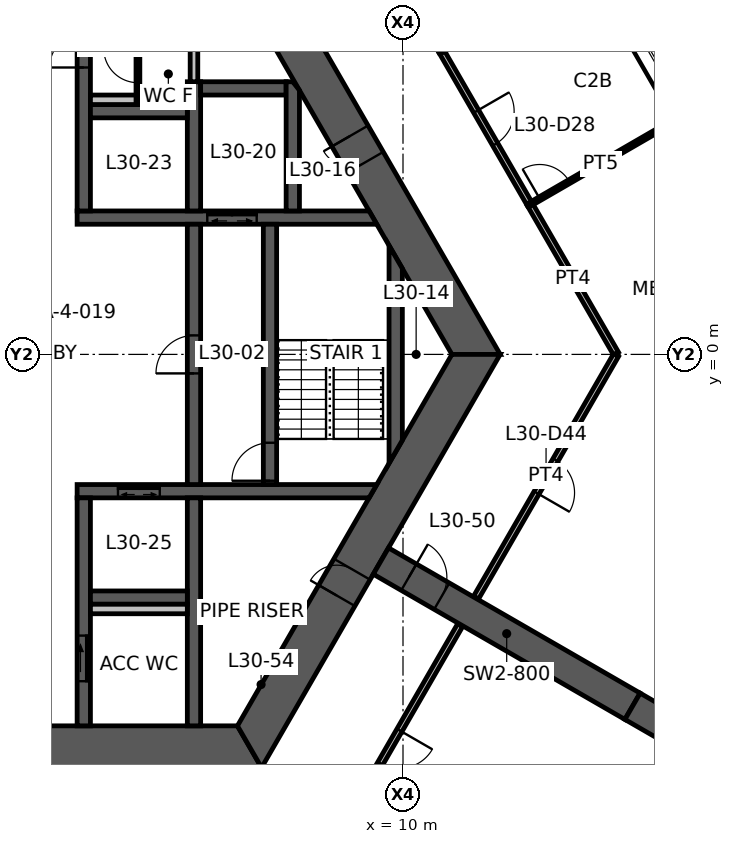
"""IFC4 building model, lengths in metres.
Left out: names, types, materials, properties, quantities, classifications, styles, units other than length and angle.
Written with IfcOpenShell. Run it as: python <this file> out.ifc"""

import sys

from ifc_helpers import new_model, si_unit, direction, frame, frame_2d, origin, place, context, subcontext, project, spatial, polyline, rectangle, outline, extrude, element, fill, save


model = new_model("IFC4")
c1 = context("Model", 3, precision=1e-05, world=origin(), true_north=direction((0.0, 1.0)))
c2 = subcontext(c1, "Body", "Model", "MODEL_VIEW")
j1 = project(units=[si_unit("LENGTHUNIT", "METRE"), si_unit("PLANEANGLEUNIT", "RADIAN")], contexts=[c1])
p1 = place(None, origin())
s1 = spatial("IfcSite", under=j1, at=p1, CompositionType="ELEMENT")
p2 = place(p1, origin())
s2 = spatial("IfcBuilding", under=s1, at=p2, CompositionType="ELEMENT")
p3 = place(p2, frame((0.0, 0.0, 119.7)))
s3 = spatial("IfcBuildingStorey", under=s2, at=p3, CompositionType="ELEMENT", Elevation=119.7)
p4 = place(p3, frame((11.922, 0.0, 0.0), z_axis=(0.0, 0.0, 1.0), x_axis=(-0.500004296715, 0.866022923061, 0.0)))
e1 = element("IfcWall", 1, at=p4, inside=s3, PredefinedType="SHEAR", context=c2, shape_type="SweptSolid", body=[
    extrude(outline(polyline([(-0.318, -0.55), (5.835, -0.55), (6.635, -0.55), (12.24, -0.55), (11.605, 0.55), (6.635, 0.55), (5.835, 0.55), (0.318, 0.55), (-0.318, -0.55)])), origin(), (0.0, 0.0, 1.0), 3.9),
])
p5 = place(p4, frame((5.835, 0.0, 0.0)))
e2 = element("IfcOpeningElement", 2, at=p5, cuts=e1, PredefinedType="OPENING", context=c2, shape_type="SweptSolid", body=[
    extrude(rectangle(XDim=0.8, YDim=2.1, at=frame_2d((0.4, 1.05))), frame((0.0, 0.56, 0.0), z_axis=(0.0, -1.0, 0.0), x_axis=(1.0, 0.0, 0.0)), (0.0, 0.0, 1.0), 1.12),
])
p6 = place(p3, frame((-5.961, -10.325, 0.0), z_axis=(0.0, 0.0, 1.0), x_axis=(1.0, 0.0, 0.0)))
e3 = element("IfcWall", 3, at=p6, inside=s3, PredefinedType="SHEAR", context=c2, shape_type="SweptSolid", body=[
    extrude(outline(polyline([(-0.318, -0.55), (5.461, -0.55), (6.461, -0.55), (12.24, -0.55), (11.605, 0.55), (6.461, 0.55), (5.461, 0.55), (0.318, 0.55), (-0.318, -0.55)])), origin(), (0.0, 0.0, 1.0), 3.9),
])
p7 = place(p6, frame((5.461, 0.0, 0.0)))
e4 = element("IfcOpeningElement", 4, at=p7, cuts=e3, PredefinedType="OPENING", context=c2, shape_type="SweptSolid", body=[
    extrude(rectangle(XDim=1.0, YDim=2.1, at=frame_2d((0.5, 1.05))), frame((0.0, 0.56, 0.0), z_axis=(0.0, -1.0, 0.0), x_axis=(1.0, 0.0, 0.0)), (0.0, 0.0, 1.0), 1.12),
])
p8 = place(p3, frame((5.961, -10.325, 0.0), z_axis=(0.0, 0.0, 1.0), x_axis=(0.500004296715, 0.866022923061, 0.0)))
e5 = element("IfcWall", 5, at=p8, inside=s3, PredefinedType="SHEAR", context=c2, shape_type="SweptSolid", body=[
    extrude(outline(polyline([(-0.318, -0.55), (4.594, -0.55), (5.394, -0.55), (12.24, -0.55), (11.605, 0.55), (5.394, 0.55), (4.594, 0.55), (0.318, 0.55), (-0.318, -0.55)])), origin(), (0.0, 0.0, 1.0), 3.9),
])
p9 = place(p8, frame((4.594, 0.0, 0.0)))
e6 = element("IfcOpeningElement", 6, at=p9, cuts=e5, PredefinedType="OPENING", context=c2, shape_type="SweptSolid", body=[
    extrude(rectangle(XDim=0.8, YDim=2.1, at=frame_2d((0.4, 1.05))), frame((0.0, 0.56, 0.0), z_axis=(0.0, -1.0, 0.0), x_axis=(1.0, 0.0, 0.0)), (0.0, 0.0, 1.0), 1.12),
])
p10 = place(p3, frame((9.418, -5.438, 0.0), z_axis=(0.0, 0.0, 1.0), x_axis=(0.866029782078, -0.499992416496, 0.0)))
e7 = element("IfcWall", 7, at=p10, inside=s3, PredefinedType="SHEAR", context=c2, shape_type="SweptSolid", body=[
    extrude(rectangle(XDim=7.646, YDim=0.8, at=frame_2d((3.823, 0.0))), origin(), (0.0, 0.0, 1.0), 3.9),
])
p11 = place(p10, frame((0.85, 0.0, 0.0)))
e8 = element("IfcOpeningElement", 8, at=p11, cuts=e7, PredefinedType="OPENING", context=c2, shape_type="SweptSolid", body=[
    extrude(rectangle(XDim=1.0, YDim=2.1, at=frame_2d((0.5, 1.05))), frame((0.0, 0.41, 0.0), z_axis=(0.0, -1.0, 0.0), x_axis=(1.0, 0.0, 0.0)), (0.0, 0.0, 1.0), 0.82),
])
p12 = place(p3, frame((16.039, -9.26, 0.0), z_axis=(0.0, 0.0, 1.0), x_axis=(0.866024837091, -0.50000098154, 0.0)))
e9 = element("IfcWall", 9, at=p12, inside=s3, PredefinedType="SHEAR", context=c2, shape_type="SweptSolid", body=[
    extrude(rectangle(XDim=13.0, YDim=0.8, at=frame_2d((6.5, 0.0))), origin(), (0.0, 0.0, 1.0), 3.9),
])
p13 = place(p3, frame((1.425, 3.6, 0.0), z_axis=(0.0, 0.0, 1.0), x_axis=(1.0, 0.0, 0.0)))
e10 = element("IfcWall", 10, at=p13, inside=s3, PredefinedType="SHEAR", context=c2, shape_type="SweptSolid", body=[
    extrude(outline(polyline([(0.0, -0.175), (3.425, -0.175), (4.725, -0.175), (7.885, -0.175), (7.683, 0.175), (4.725, 0.175), (3.425, 0.175), (0.0, 0.175), (0.0, -0.175)])), origin(), (0.0, 0.0, 1.0), 3.9),
])
p14 = place(p13, frame((3.425, 0.0, 0.0)))
e11 = element("IfcOpeningElement", 11, at=p14, cuts=e10, PredefinedType="OPENING", context=c2, shape_type="SweptSolid", body=[
    extrude(rectangle(XDim=1.3, YDim=2.1, at=frame_2d((0.65, 1.05))), frame((0.0, 0.185, 0.0), z_axis=(0.0, -1.0, 0.0), x_axis=(1.0, 0.0, 0.0)), (0.0, 0.0, 1.0), 0.37),
])
p15 = place(p3, frame((1.425, -3.6, 0.0), z_axis=(0.0, 0.0, 1.0), x_axis=(1.0, 0.0, 0.0)))
e12 = element("IfcWall", 12, at=p15, inside=s3, PredefinedType="SHEAR", context=c2, shape_type="SweptSolid", body=[
    extrude(outline(polyline([(0.0, -0.175), (1.075, -0.175), (2.175, -0.175), (7.683, -0.175), (7.885, 0.175), (2.175, 0.175), (1.075, 0.175), (0.0, 0.175), (0.0, -0.175)])), origin(), (0.0, 0.0, 1.0), 3.9),
])
p16 = place(p15, frame((1.075, 0.0, 0.0)))
e13 = element("IfcOpeningElement", 13, at=p16, cuts=e12, PredefinedType="OPENING", context=c2, shape_type="SweptSolid", body=[
    extrude(rectangle(XDim=1.1, YDim=2.1, at=frame_2d((0.55, 1.05))), frame((0.0, 0.185, 0.0), z_axis=(0.0, -1.0, 0.0), x_axis=(1.0, 0.0, 0.0)), (0.0, 0.0, 1.0), 0.37),
])
p17 = place(p3, frame((1.6, 3.775, 0.0), z_axis=(0.0, 0.0, 1.0), x_axis=(0.0, 1.0, 0.0)))
e14 = element("IfcWall", 14, at=p17, inside=s3, PredefinedType="SHEAR", context=c2, shape_type="SweptSolid", body=[
    extrude(rectangle(XDim=6.0, YDim=0.35, at=frame_2d((3.0, 0.0))), origin(), (0.0, 0.0, 1.0), 3.9),
])
p18 = place(p17, frame((3.775, 0.0, 0.0)))
e15 = element("IfcOpeningElement", 15, at=p18, cuts=e14, PredefinedType="OPENING", context=c2, shape_type="SweptSolid", body=[
    extrude(rectangle(XDim=0.9, YDim=2.1, at=frame_2d((0.45, 1.05))), frame((0.0, 0.185, 0.0), z_axis=(0.0, -1.0, 0.0), x_axis=(1.0, 0.0, 0.0)), (0.0, 0.0, 1.0), 0.37),
])
p19 = place(p3, frame((1.6, -3.775, 0.0), z_axis=(0.0, 0.0, 1.0), x_axis=(0.0, -1.0, 0.0)))
e16 = element("IfcWall", 16, at=p19, inside=s3, PredefinedType="SHEAR", context=c2, shape_type="SweptSolid", body=[
    extrude(rectangle(XDim=6.0, YDim=0.35, at=frame_2d((3.0, 0.0))), origin(), (0.0, 0.0, 1.0), 3.9),
])
p20 = place(p19, frame((3.625, 0.0, 0.0)))
e17 = element("IfcOpeningElement", 17, at=p20, cuts=e16, PredefinedType="OPENING", context=c2, shape_type="SweptSolid", body=[
    extrude(rectangle(XDim=1.2, YDim=2.1, at=frame_2d((0.6, 1.05))), frame((0.0, 0.185, 0.0), z_axis=(0.0, -1.0, 0.0), x_axis=(1.0, 0.0, 0.0)), (0.0, 0.0, 1.0), 0.37),
])
p21 = place(p3, frame((4.5, -3.425, 0.0), z_axis=(0.0, 0.0, 1.0), x_axis=(0.0, 1.0, 0.0)))
e18 = element("IfcWall", 18, at=p21, inside=s3, PredefinedType="SHEAR", context=c2, shape_type="SweptSolid", body=[
    extrude(rectangle(XDim=6.85, YDim=0.35, at=frame_2d((3.425, 0.0))), origin(), (0.0, 0.0, 1.0), 3.9),
])
p22 = place(p21, frame((2.925, 0.0, 0.0)))
e19 = element("IfcOpeningElement", 19, at=p22, cuts=e18, PredefinedType="OPENING", context=c2, shape_type="SweptSolid", body=[
    extrude(rectangle(XDim=1.0, YDim=2.1, at=frame_2d((0.5, 1.05))), frame((0.0, 0.185, 0.0), z_axis=(0.0, -1.0, 0.0), x_axis=(1.0, 0.0, 0.0)), (0.0, 0.0, 1.0), 0.37),
])
p23 = place(p3, frame((6.5, -3.425, 0.0), z_axis=(0.0, 0.0, 1.0), x_axis=(0.0, 1.0, 0.0)))
e20 = element("IfcWall", 20, at=p23, inside=s3, PredefinedType="SHEAR", context=c2, shape_type="SweptSolid", body=[
    extrude(rectangle(XDim=6.85, YDim=0.35, at=frame_2d((3.425, 0.0))), origin(), (0.0, 0.0, 1.0), 3.9),
])
p24 = place(p23, frame((0.1, 0.0, 0.0)))
e21 = element("IfcOpeningElement", 21, at=p24, cuts=e20, PredefinedType="OPENING", context=c2, shape_type="SweptSolid", body=[
    extrude(rectangle(XDim=1.0, YDim=2.1, at=frame_2d((0.5, 1.05))), frame((0.0, 0.185, 0.0), z_axis=(0.0, -1.0, 0.0), x_axis=(1.0, 0.0, 0.0)), (0.0, 0.0, 1.0), 0.37),
])
p25 = place(p3, frame((4.5, 3.775, 0.0), z_axis=(0.0, 0.0, 1.0), x_axis=(0.0, 1.0, 0.0)))
e22 = element("IfcWall", 22, at=p25, inside=s3, PredefinedType="SHEAR", context=c2, shape_type="SweptSolid", body=[
    extrude(rectangle(XDim=3.4, YDim=0.35, at=frame_2d((1.7, 0.0))), origin(), (0.0, 0.0, 1.0), 3.9),
])
p26 = place(p3, frame((4.5, -3.775, 0.0), z_axis=(0.0, 0.0, 1.0), x_axis=(0.0, -1.0, 0.0)))
e23 = element("IfcWall", 23, at=p26, inside=s3, PredefinedType="SHEAR", context=c2, shape_type="SweptSolid", body=[
    extrude(rectangle(XDim=6.0, YDim=0.35, at=frame_2d((3.0, 0.0))), origin(), (0.0, 0.0, 1.0), 3.9),
])
for number, where, z_axis, x_axis in (
    (24, (1.775, 6.4, 0.0), (0.0, 0.0, 1.0), (1.0, 0.0, 0.0)),
    (25, (1.775, -6.4, 0.0), (0.0, 0.0, 1.0), (1.0, 0.0, 0.0)),
):
    element("IfcWall", number, at=place(p3, frame(where, z_axis=z_axis, x_axis=x_axis)), inside=s3, PredefinedType="SHEAR", context=c2, shape_type="SweptSolid", body=[
        extrude(rectangle(XDim=2.55, YDim=0.35, at=frame_2d((1.275, 0.0))), origin(), (0.0, 0.0, 1.0), 3.9),
    ])
p27 = place(p3, frame((4.675, 7.0, 0.0), z_axis=(0.0, 0.0, 1.0), x_axis=(1.0, 0.0, 0.0)))
e26 = element("IfcWall", 26, at=p27, inside=s3, PredefinedType="SHEAR", context=c2, shape_type="SweptSolid", body=[
    extrude(rectangle(XDim=2.25, YDim=0.35, at=frame_2d((1.125, 0.0))), origin(), (0.0, 0.0, 1.0), 3.9),
])
p28 = place(p3, frame((7.1, 3.775, 0.0), z_axis=(0.0, 0.0, 1.0), x_axis=(0.0, 1.0, 0.0)))
e27 = element("IfcWall", 27, at=p28, inside=s3, PredefinedType="SHEAR", context=c2, shape_type="SweptSolid", body=[
    extrude(outline(polyline([(0.0, -0.175), (3.175, -0.175), (3.4, 0.0), (3.4, 0.175), (0.0, 0.175), (0.0, -0.175)])), origin(), (0.0, 0.0, 1.0), 3.9),
])
p29 = place(p3, frame((9.808, -2.562, 0.0), z_axis=(0.0, 0.0, 1.0), x_axis=(0.0, 1.0, 0.0)))
e28 = element("IfcWall", 28, at=p29, inside=s3, PredefinedType="SHEAR", context=c2, shape_type="SweptSolid", body=[
    extrude(outline(polyline([(0.303, -0.175), (4.821, -0.175), (5.428, 0.175), (-0.303, 0.175), (0.303, -0.175)])), origin(), (0.0, 0.0, 1.0), 3.9),
])
p30 = place(p3, frame((4.5, 7.175, 0.0), z_axis=(0.0, 0.0, 1.0), x_axis=(0.0, 1.0, 0.0)))
e29 = element("IfcWall", 29, at=p30, inside=s3, PredefinedType="STANDARD", context=c2, shape_type="SweptSolid", body=[
    extrude(rectangle(XDim=2.6, YDim=0.2, at=frame_2d((1.3, 0.0))), origin(), (0.0, 0.0, 1.0), 3.9),
])
for number, where, z_axis, x_axis in (
    (30, (1.775, 6.7, 0.0), (0.0, 0.0, 1.0), (1.0, 0.0, 0.0)),
    (31, (1.775, -6.7, 0.0), (0.0, 0.0, 1.0), (1.0, 0.0, 0.0)),
):
    element("IfcWall", number, at=place(p3, frame(where, z_axis=z_axis, x_axis=x_axis)), inside=s3, PredefinedType="PLUMBINGWALL", context=c2, shape_type="SweptSolid", body=[
        extrude(rectangle(XDim=2.55, YDim=0.25, at=frame_2d((1.275, 0.0))), origin(), (0.0, 0.0, 1.0), 3.9),
    ])
p31 = place(p3, frame((3.025, 6.575, 0.0), z_axis=(0.0, 0.0, 1.0), x_axis=(0.0, 1.0, 0.0)))
e32 = element("IfcWall", 32, at=p31, inside=s3, PredefinedType="PARTITIONING", context=c2, shape_type="SweptSolid", body=[
    extrude(rectangle(XDim=3.2, YDim=0.1, at=frame_2d((1.6, 0.0))), origin(), (0.0, 0.0, 1.0), 2.35),
])
p32 = place(p31, frame((0.575, 0.0, 0.0)))
e33 = element("IfcOpeningElement", 33, at=p32, cuts=e32, PredefinedType="OPENING", context=c2, shape_type="SweptSolid", body=[
    extrude(rectangle(XDim=0.9, YDim=2.1, at=frame_2d((0.45, 1.05))), frame((0.0, 0.06, 0.0), z_axis=(0.0, -1.0, 0.0), x_axis=(1.0, 0.0, 0.0)), (0.0, 0.0, 1.0), 0.12),
])
p33 = place(p31, frame((2.1, 0.0, 0.0)))
e34 = element("IfcOpeningElement", 34, at=p33, cuts=e32, PredefinedType="OPENING", context=c2, shape_type="SweptSolid", body=[
    extrude(rectangle(XDim=0.9, YDim=2.1, at=frame_2d((0.45, 1.05))), frame((0.0, 0.06, 0.0), z_axis=(0.0, -1.0, 0.0), x_axis=(1.0, 0.0, 0.0)), (0.0, 0.0, 1.0), 0.12),
])
p34 = place(p3, frame((9.51, 10.577, 0.0), z_axis=(0.0, 0.0, 1.0), x_axis=(0.499977562641, -0.866038357612, 0.0)))
e35 = element("IfcWall", 35, at=p34, inside=s3, PredefinedType="PARTITIONING", context=c2, shape_type="SweptSolid", body=[
    extrude(rectangle(XDim=3.01, YDim=0.15, at=frame_2d((1.505, 0.0))), origin(), (0.0, 0.0, 1.0), 2.35),
])
p35 = place(p3, frame((13.334, 3.955, 0.0), z_axis=(0.0, 0.0, 1.0), x_axis=(0.499987549055, -0.866032592222, 0.0)))
e36 = element("IfcWall", 36, at=p35, inside=s3, PredefinedType="PARTITIONING", context=c2, shape_type="SweptSolid", body=[
    extrude(rectangle(XDim=4.544, YDim=0.15, at=frame_2d((2.272, 0.0))), origin(), (0.0, 0.0, 1.0), 2.35),
])
p36 = place(p3, frame((11.011, 7.979, 0.0), z_axis=(0.0, 0.0, 1.0), x_axis=(0.500008456887, -0.866020521143, 0.0)))
e37 = element("IfcWall", 37, at=p36, inside=s3, PredefinedType="PARTITIONING", context=c2, shape_type="SweptSolid", body=[
    extrude(rectangle(XDim=4.655, YDim=0.15, at=frame_2d((2.328, 0.0))), origin(), (0.0, 0.0, 1.0), 2.35),
])
p37 = place(p36, frame((1.828, 0.0, 0.0)))
e38 = element("IfcOpeningElement", 38, at=p37, cuts=e37, PredefinedType="OPENING", context=c2, shape_type="SweptSolid", body=[
    extrude(rectangle(XDim=1.0, YDim=2.1, at=frame_2d((0.5, 1.05))), frame((0.0, 0.085, 0.0), z_axis=(0.0, -1.0, 0.0), x_axis=(1.0, 0.0, 0.0)), (0.0, 0.0, 1.0), 0.17),
])
p38 = place(p3, frame((13.438, 9.375, 0.0), z_axis=(0.0, 0.0, 1.0), x_axis=(-0.866817750494, -0.498625097071, 0.0)))
e39 = element("IfcWall", 39, at=p38, inside=s3, PredefinedType="PARTITIONING", context=c2, shape_type="SweptSolid", body=[
    extrude(rectangle(XDim=2.8, YDim=0.1, at=frame_2d((1.4, 0.0))), origin(), (0.0, 0.0, 1.0), 2.35),
])
p39 = place(p3, frame((13.338, 3.947, 0.0), z_axis=(0.0, 0.0, 1.0), x_axis=(0.865505397626, 0.500899597405, 0.0)))
e40 = element("IfcWall", 40, at=p39, inside=s3, PredefinedType="PARTITIONING", context=c2, shape_type="SweptSolid", body=[
    extrude(rectangle(XDim=4.295, YDim=0.1, at=frame_2d((2.148, 0.0))), origin(), (0.0, 0.0, 1.0), 2.35),
])
p40 = place(p39, frame((0.3, 0.0, 0.0)))
e41 = element("IfcOpeningElement", 41, at=p40, cuts=e40, PredefinedType="OPENING", context=c2, shape_type="SweptSolid", body=[
    extrude(rectangle(XDim=0.9, YDim=2.1, at=frame_2d((0.45, 1.05))), frame((0.0, 0.06, 0.0), z_axis=(0.0, -1.0, 0.0), x_axis=(1.0, 0.0, 0.0)), (0.0, 0.0, 1.0), 0.12),
])
p41 = place(p3, frame((15.606, -0.02, 0.0), z_axis=(0.0, 0.0, 1.0), x_axis=(-0.499989298045, -0.866031582473, 0.0)))
e42 = element("IfcWall", 42, at=p41, inside=s3, PredefinedType="PARTITIONING", context=c2, shape_type="SweptSolid", body=[
    extrude(rectangle(XDim=7.365, YDim=0.15, at=frame_2d((3.683, 0.0))), origin(), (0.0, 0.0, 1.0), 2.35),
])
p42 = place(p41, frame((3.183, 0.0, 0.0)))
e43 = element("IfcOpeningElement", 43, at=p42, cuts=e42, PredefinedType="OPENING", context=c2, shape_type="SweptSolid", body=[
    extrude(rectangle(XDim=1.0, YDim=2.1, at=frame_2d((0.5, 1.05))), frame((0.0, 0.085, 0.0), z_axis=(0.0, -1.0, 0.0), x_axis=(1.0, 0.0, 0.0)), (0.0, 0.0, 1.0), 0.17),
])
p43 = place(p3, frame((11.503, -7.126, 0.0), z_axis=(0.0, 0.0, 1.0), x_axis=(-0.500005620463, -0.866022158784, 0.0)))
e44 = element("IfcWall", 44, at=p43, inside=s3, PredefinedType="PARTITIONING", context=c2, shape_type="SweptSolid", body=[
    extrude(rectangle(XDim=7.389, YDim=0.15, at=frame_2d((3.694, 0.0))), origin(), (0.0, 0.0, 1.0), 2.35),
])
p44 = place(p43, frame((3.194, 0.0, 0.0)))
e45 = element("IfcOpeningElement", 45, at=p44, cuts=e44, PredefinedType="OPENING", context=c2, shape_type="SweptSolid", body=[
    extrude(rectangle(XDim=1.0, YDim=2.1, at=frame_2d((0.5, 1.05))), frame((0.0, 0.085, 0.0), z_axis=(0.0, -1.0, 0.0), x_axis=(1.0, 0.0, 0.0)), (0.0, 0.0, 1.0), 0.17),
])
p45 = place(p5, origin())
e46 = element("IfcDoor", 46, at=p45, inside=s3, OperationType="SINGLE_SWING_RIGHT", PredefinedType="DOOR", context=c2, shape_type="SweptSolid", body=[
    extrude(rectangle(XDim=0.8, YDim=2.1, at=frame_2d((0.4, 1.05))), frame((0.0, 0.025, 0.0), z_axis=(0.0, -1.0, 0.0), x_axis=(1.0, 0.0, 0.0)), (0.0, 0.0, 1.0), 0.05),
])
fill(e2, e46)
p46 = place(p9, origin())
e47 = element("IfcDoor", 47, at=p46, inside=s3, OperationType="SINGLE_SWING_LEFT", PredefinedType="DOOR", context=c2, shape_type="SweptSolid", body=[
    extrude(rectangle(XDim=0.8, YDim=2.1, at=frame_2d((0.4, 1.05))), frame((0.0, 0.025, 0.0), z_axis=(0.0, -1.0, 0.0), x_axis=(1.0, 0.0, 0.0)), (0.0, 0.0, 1.0), 0.05),
])
fill(e6, e47)
p47 = place(p22, origin())
e48 = element("IfcDoor", 48, at=p47, inside=s3, OperationType="SINGLE_SWING_LEFT", PredefinedType="DOOR", context=c2, shape_type="SweptSolid", body=[
    extrude(rectangle(XDim=1.0, YDim=2.1, at=frame_2d((0.5, 1.05))), frame((0.0, 0.025, 0.0), z_axis=(0.0, -1.0, 0.0), x_axis=(1.0, 0.0, 0.0)), (0.0, 0.0, 1.0), 0.05),
])
fill(e19, e48)
p48 = place(p24, origin())
e49 = element("IfcDoor", 49, at=p48, inside=s3, OperationType="SINGLE_SWING_LEFT", PredefinedType="DOOR", context=c2, shape_type="SweptSolid", body=[
    extrude(rectangle(XDim=1.0, YDim=2.1, at=frame_2d((0.5, 1.05))), frame((0.0, 0.025, 0.0), z_axis=(0.0, -1.0, 0.0), x_axis=(1.0, 0.0, 0.0)), (0.0, 0.0, 1.0), 0.05),
])
fill(e21, e49)
p49 = place(p18, origin())
e50 = element("IfcDoor", 50, at=p49, inside=s3, OperationType="SINGLE_SWING_LEFT", PredefinedType="DOOR", context=c2, shape_type="SweptSolid", body=[
    extrude(rectangle(XDim=0.9, YDim=2.1, at=frame_2d((0.45, 1.05))), frame((0.0, 0.025, 0.0), z_axis=(0.0, -1.0, 0.0), x_axis=(1.0, 0.0, 0.0)), (0.0, 0.0, 1.0), 0.05),
])
fill(e15, e50)
p50 = place(p20, origin())
e51 = element("IfcDoor", 51, at=p50, inside=s3, OperationType="SLIDING_TO_LEFT", PredefinedType="DOOR", context=c2, shape_type="SweptSolid", body=[
    extrude(rectangle(XDim=1.2, YDim=2.1, at=frame_2d((0.6, 1.05))), frame((0.0, 0.025, 0.0), z_axis=(0.0, -1.0, 0.0), x_axis=(1.0, 0.0, 0.0)), (0.0, 0.0, 1.0), 0.05),
])
fill(e17, e51)
p51 = place(p11, origin())
e52 = element("IfcDoor", 52, at=p51, inside=s3, OperationType="SINGLE_SWING_LEFT", PredefinedType="DOOR", context=c2, shape_type="SweptSolid", body=[
    extrude(rectangle(XDim=1.0, YDim=2.1, at=frame_2d((0.5, 1.05))), frame((0.0, 0.025, 0.0), z_axis=(0.0, -1.0, 0.0), x_axis=(1.0, 0.0, 0.0)), (0.0, 0.0, 1.0), 0.05),
])
fill(e8, e52)
p52 = place(p32, origin())
e53 = element("IfcDoor", 53, at=p52, inside=s3, OperationType="SINGLE_SWING_RIGHT", PredefinedType="DOOR", context=c2, shape_type="SweptSolid", body=[
    extrude(rectangle(XDim=0.9, YDim=2.1, at=frame_2d((0.45, 1.05))), frame((0.0, 0.025, 0.0), z_axis=(0.0, -1.0, 0.0), x_axis=(1.0, 0.0, 0.0)), (0.0, 0.0, 1.0), 0.05),
])
fill(e33, e53)
p53 = place(p37, origin())
e54 = element("IfcDoor", 54, at=p53, inside=s3, OperationType="SINGLE_SWING_LEFT", PredefinedType="DOOR", context=c2, shape_type="SweptSolid", body=[
    extrude(rectangle(XDim=1.0, YDim=2.1, at=frame_2d((0.5, 1.05))), frame((0.0, 0.025, 0.0), z_axis=(0.0, -1.0, 0.0), x_axis=(1.0, 0.0, 0.0)), (0.0, 0.0, 1.0), 0.05),
])
fill(e38, e54)
p54 = place(p40, origin())
e55 = element("IfcDoor", 55, at=p54, inside=s3, OperationType="SINGLE_SWING_LEFT", PredefinedType="DOOR", context=c2, shape_type="SweptSolid", body=[
    extrude(rectangle(XDim=0.9, YDim=2.1, at=frame_2d((0.45, 1.05))), frame((0.0, 0.025, 0.0), z_axis=(0.0, -1.0, 0.0), x_axis=(1.0, 0.0, 0.0)), (0.0, 0.0, 1.0), 0.05),
])
fill(e41, e55)
p55 = place(p42, origin())
e56 = element("IfcDoor", 56, at=p55, inside=s3, OperationType="SINGLE_SWING_RIGHT", PredefinedType="DOOR", context=c2, shape_type="SweptSolid", body=[
    extrude(rectangle(XDim=1.0, YDim=2.1, at=frame_2d((0.5, 1.05))), frame((0.0, 0.025, 0.0), z_axis=(0.0, -1.0, 0.0), x_axis=(1.0, 0.0, 0.0)), (0.0, 0.0, 1.0), 0.05),
])
fill(e43, e56)
p56 = place(p44, origin())
e57 = element("IfcDoor", 57, at=p56, inside=s3, OperationType="SINGLE_SWING_LEFT", PredefinedType="DOOR", context=c2, shape_type="SweptSolid", body=[
    extrude(rectangle(XDim=1.0, YDim=2.1, at=frame_2d((0.5, 1.05))), frame((0.0, 0.025, 0.0), z_axis=(0.0, -1.0, 0.0), x_axis=(1.0, 0.0, 0.0)), (0.0, 0.0, 1.0), 0.05),
])
fill(e45, e57)
p57 = place(p16, origin())
e58 = element("IfcDoor", 58, at=p57, inside=s3, OperationType="DOUBLE_DOOR_SLIDING", PredefinedType="DOOR", context=c2, shape_type="SweptSolid", body=[
    extrude(rectangle(XDim=1.1, YDim=2.1, at=frame_2d((0.55, 1.05))), frame((0.0, 0.025, 0.0), z_axis=(0.0, -1.0, 0.0), x_axis=(1.0, 0.0, 0.0)), (0.0, 0.0, 1.0), 0.05),
])
fill(e13, e58)
p58 = place(p14, origin())
e59 = element("IfcDoor", 59, at=p58, inside=s3, OperationType="DOUBLE_DOOR_SLIDING", PredefinedType="DOOR", context=c2, shape_type="SweptSolid", body=[
    extrude(rectangle(XDim=1.3, YDim=2.1, at=frame_2d((0.65, 1.05))), frame((0.0, 0.025, 0.0), z_axis=(0.0, -1.0, 0.0), x_axis=(1.0, 0.0, 0.0)), (0.0, 0.0, 1.0), 0.05),
])
fill(e11, e59)
save(model, sys.argv[1])
